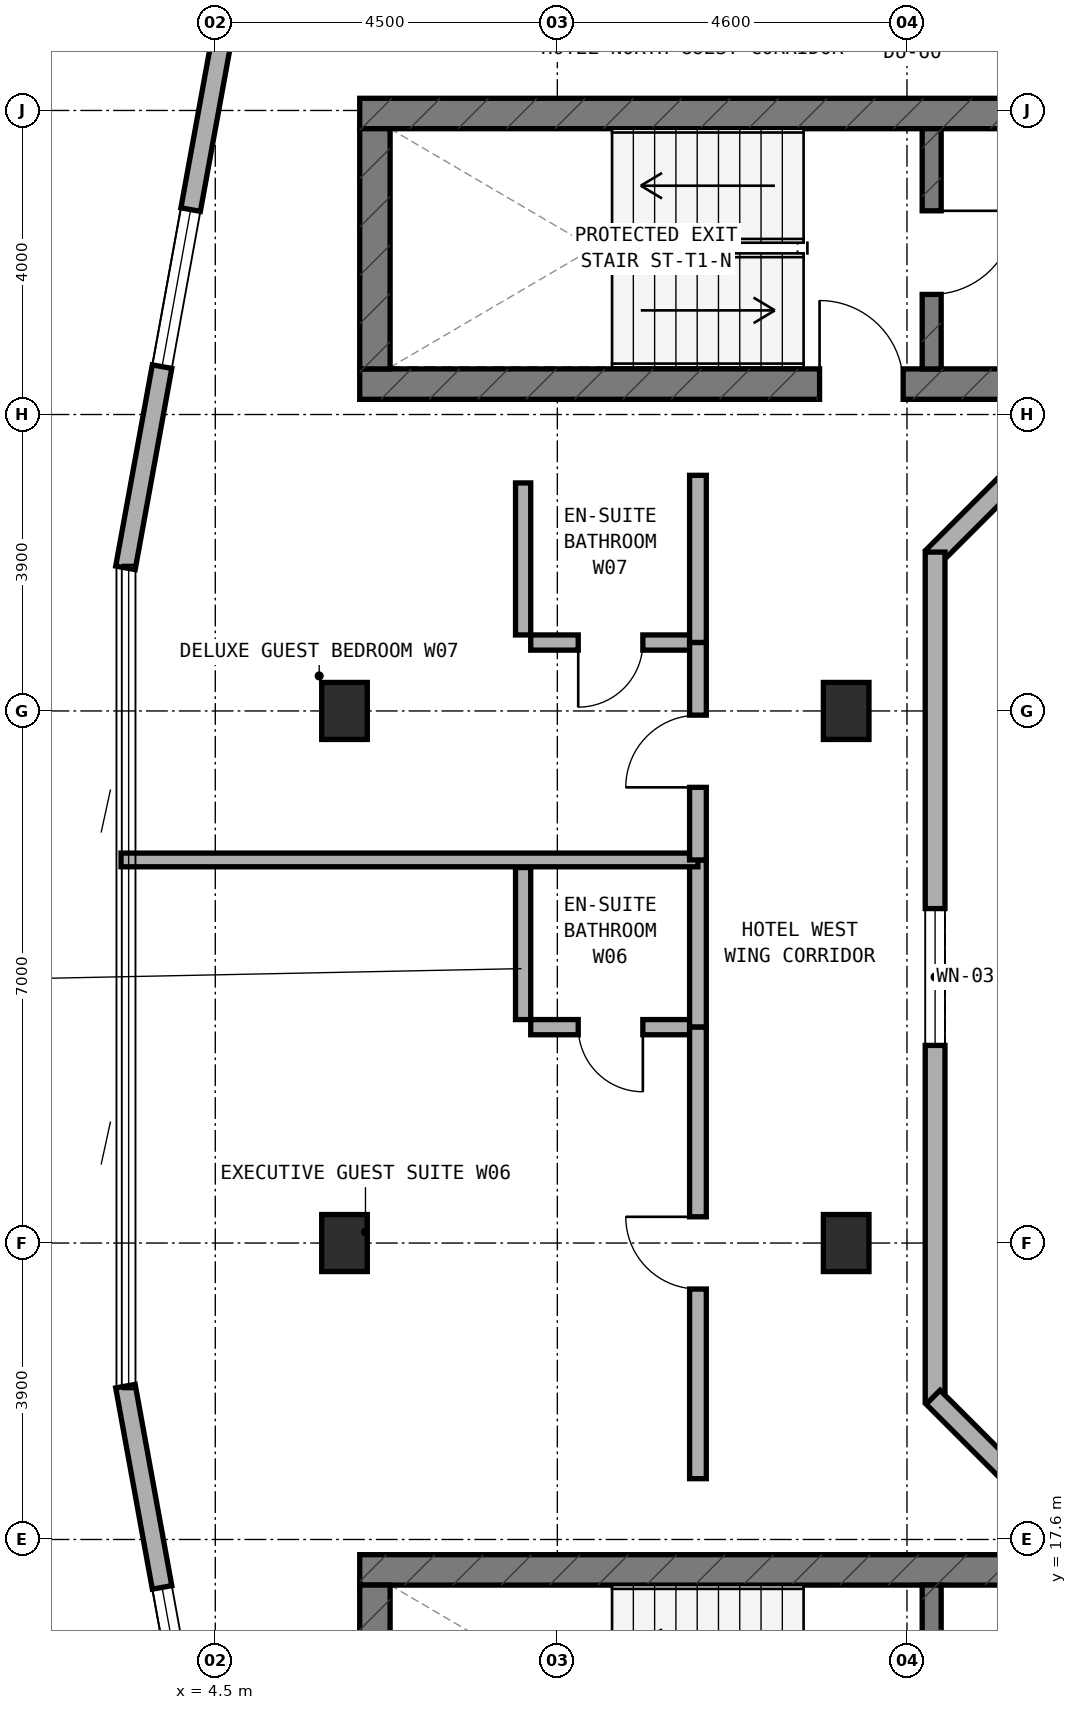
"""IFC4 building model, lengths in metres.
Left out: names, types, materials, properties, quantities, classifications, styles, units other than length and angle.
Written with IfcOpenShell. Run it as: python <this file> out.ifc"""

import sys

from ifc_helpers import new_model, si_unit, direction, frame, frame_2d, origin, origin_2d, place, context, subcontext, project, spatial, rectangle, extrude, element, fill, save


model = new_model("IFC4")
c1 = context("Model", 3, precision=1e-05, world=origin(), true_north=direction((0.0, 1.0)))
c2 = subcontext(c1, "Body", "Model", "MODEL_VIEW")
j1 = project(units=[si_unit("LENGTHUNIT", "METRE"), si_unit("PLANEANGLEUNIT", "RADIAN")], contexts=[c1])
p1 = place(None, origin())
s1 = spatial("IfcSite", under=j1, at=p1, CompositionType="ELEMENT")
p2 = place(p1, origin())
s2 = spatial("IfcBuilding", under=s1, at=p2, CompositionType="ELEMENT")
p3 = place(p2, frame((0.0, 0.0, 254.0)))
s3 = spatial("IfcBuildingStorey", under=s2, at=p3, CompositionType="ELEMENT", Elevation=254.0)
p4 = place(p3, frame((6.4, 32.8, 0.0), z_axis=(0.0, 0.0, 1.0), x_axis=(1.0, 0.0, 0.0)))
e1 = element("IfcWall", 1, at=p4, inside=s3, PredefinedType="SHEAR", context=c2, shape_type="SweptSolid", body=[
    extrude(rectangle(XDim=24.4, YDim=0.4, at=frame_2d((12.2, 0.0))), origin(), (0.0, 0.0, 1.0), 3.6),
])
p5 = place(p4, frame((6.05, 0.0, 0.0)))
e2 = element("IfcOpeningElement", 2, at=p5, cuts=e1, PredefinedType="OPENING", context=c2, shape_type="SweptSolid", body=[
    extrude(rectangle(XDim=1.1, YDim=2.15, at=frame_2d((0.55, 1.075))), frame((0.0, 0.21, 0.0), z_axis=(0.0, -1.0, 0.0), x_axis=(1.0, 0.0, 0.0)), (0.0, 0.0, 1.0), 0.42),
])
p6 = place(p3, frame((6.4, 36.36, 0.0), z_axis=(0.0, 0.0, 1.0), x_axis=(1.0, 0.0, 0.0)))
e3 = element("IfcWall", 3, at=p6, inside=s3, PredefinedType="SHEAR", context=c2, shape_type="SweptSolid", body=[
    extrude(rectangle(XDim=24.4, YDim=0.4, at=frame_2d((12.2, 0.0))), origin(), (0.0, 0.0, 1.0), 3.6),
])
p7 = place(p6, frame((9.15, 0.0, 0.0)))
e4 = element("IfcOpeningElement", 4, at=p7, cuts=e3, PredefinedType="OPENING", context=c2, shape_type="SweptSolid", body=[
    extrude(rectangle(XDim=1.2, YDim=2.15, at=frame_2d((0.6, 1.075))), frame((0.0, 0.21, 0.0), z_axis=(0.0, -1.0, 0.0), x_axis=(1.0, 0.0, 0.0)), (0.0, 0.0, 1.0), 0.42),
])
p8 = place(p6, frame((19.2, 0.0, 0.0)))
e5 = element("IfcOpeningElement", 5, at=p8, cuts=e3, PredefinedType="OPENING", context=c2, shape_type="SweptSolid", body=[
    extrude(rectangle(XDim=0.85, YDim=2.1, at=frame_2d((0.425, 1.05))), frame((0.0, 0.21, 0.0), z_axis=(0.0, -1.0, 0.0), x_axis=(1.0, 0.0, 0.0)), (0.0, 0.0, 1.0), 0.42),
])
p9 = place(p6, frame((16.94, 0.0, 0.0)))
e6 = element("IfcOpeningElement", 6, at=p9, cuts=e3, PredefinedType="OPENING", context=c2, shape_type="SweptSolid", body=[
    extrude(rectangle(XDim=0.85, YDim=2.1, at=frame_2d((0.425, 1.05))), frame((0.0, 0.21, 0.0), z_axis=(0.0, -1.0, 0.0), x_axis=(1.0, 0.0, 0.0)), (0.0, 0.0, 1.0), 0.42),
])
p10 = place(p3, frame((6.6, 33.0, 0.0), z_axis=(0.0, 0.0, 1.0), x_axis=(0.0, 1.0, 0.0)))
e7 = element("IfcWall", 7, at=p10, inside=s3, PredefinedType="SHEAR", context=c2, shape_type="SweptSolid", body=[
    extrude(rectangle(XDim=3.16, YDim=0.4, at=frame_2d((1.58, 0.0))), origin(), (0.0, 0.0, 1.0), 3.6),
])
p11 = place(p3, frame((13.925, 33.0, 0.0), z_axis=(0.0, 0.0, 1.0), x_axis=(0.0, 1.0, 0.0)))
e8 = element("IfcWall", 8, at=p11, inside=s3, PredefinedType="STANDARD", context=c2, shape_type="SweptSolid", body=[
    extrude(rectangle(XDim=3.16, YDim=0.25, at=frame_2d((1.58, 0.0))), origin(), (0.0, 0.0, 1.0), 3.32),
])
p12 = place(p11, frame((0.98, 0.0, 0.0)))
e9 = element("IfcOpeningElement", 9, at=p12, cuts=e8, PredefinedType="OPENING", context=c2, shape_type="SweptSolid", body=[
    extrude(rectangle(XDim=1.1, YDim=2.15, at=frame_2d((0.55, 1.075))), frame((0.0, 0.135, 0.0), z_axis=(0.0, -1.0, 0.0), x_axis=(1.0, 0.0, 0.0)), (0.0, 0.0, 1.0), 0.27),
])
p13 = place(p3, frame((6.4, 17.2, 0.0), z_axis=(0.0, 0.0, 1.0), x_axis=(1.0, 0.0, 0.0)))
e10 = element("IfcWall", 10, at=p13, inside=s3, PredefinedType="SHEAR", context=c2, shape_type="SweptSolid", body=[
    extrude(rectangle(XDim=24.4, YDim=0.4, at=frame_2d((12.2, 0.0))), origin(), (0.0, 0.0, 1.0), 3.6),
])
p14 = place(p3, frame((6.6, 13.84, 0.0), z_axis=(0.0, 0.0, 1.0), x_axis=(0.0, 1.0, 0.0)))
e11 = element("IfcWall", 11, at=p14, inside=s3, PredefinedType="SHEAR", context=c2, shape_type="SweptSolid", body=[
    extrude(rectangle(XDim=3.16, YDim=0.4, at=frame_2d((1.58, 0.0))), origin(), (0.0, 0.0, 1.0), 3.6),
])
p15 = place(p3, frame((13.925, 13.84, 0.0), z_axis=(0.0, 0.0, 1.0), x_axis=(0.0, 1.0, 0.0)))
e12 = element("IfcWall", 12, at=p15, inside=s3, PredefinedType="STANDARD", context=c2, shape_type="SweptSolid", body=[
    extrude(rectangle(XDim=3.16, YDim=0.25, at=frame_2d((1.58, 0.0))), origin(), (0.0, 0.0, 1.0), 3.32),
])
p16 = place(p15, frame((0.98, 0.0, 0.0)))
e13 = element("IfcOpeningElement", 13, at=p16, cuts=e12, PredefinedType="OPENING", context=c2, shape_type="SweptSolid", body=[
    extrude(rectangle(XDim=1.1, YDim=2.15, at=frame_2d((0.55, 1.075))), frame((0.0, 0.135, 0.0), z_axis=(0.0, -1.0, 0.0), x_axis=(1.0, 0.0, 0.0)), (0.0, 0.0, 1.0), 0.27),
])
for number, where, z_axis, x_axis in (
    (14, (6.2, 21.5, 0.0), (0.0, 0.0, 1.0), (1.0, 0.0, 0.0)),
    (15, (6.2, 28.5, 0.0), (0.0, 0.0, 1.0), (1.0, 0.0, 0.0)),
    (16, (12.8, 21.5, 0.0), (0.0, 0.0, 1.0), (1.0, 0.0, 0.0)),
    (17, (12.8, 28.5, 0.0), (0.0, 0.0, 1.0), (1.0, 0.0, 0.0)),
):
    element("IfcColumn", number, at=place(p3, frame(where, z_axis=z_axis, x_axis=x_axis)), inside=s3, PredefinedType="COLUMN", context=c2, shape_type="SweptSolid", body=[
        extrude(rectangle(XDim=0.6, YDim=0.75, at=origin_2d()), origin(), (0.0, 0.0, 1.0), 3.6),
    ])
p17 = place(p3, frame((4.829, 38.685, 0.0), z_axis=(0.0, 0.0, 1.0), x_axis=(-0.179061111398, -0.983837953316, 0.0)))
e18 = element("IfcWall", 18, at=p17, inside=s3, PredefinedType="STANDARD", context=c2, shape_type="SweptSolid", body=[
    extrude(rectangle(XDim=8.438, YDim=0.26, at=frame_2d((4.219, 0.0))), origin(), (0.0, 0.0, 1.0), 3.32),
])
p18 = place(p17, frame((3.648, 0.0, 0.85)))
e19 = element("IfcOpeningElement", 19, at=p18, cuts=e18, PredefinedType="OPENING", context=c2, shape_type="SweptSolid", body=[
    extrude(rectangle(XDim=2.1, YDim=1.5, at=frame_2d((1.05, 0.75))), frame((0.0, 0.14, 0.0), z_axis=(0.0, -1.0, 0.0), x_axis=(1.0, 0.0, 0.0)), (0.0, 0.0, 1.0), 0.28),
])
p19 = place(p3, frame((3.318, 19.617, 0.0), z_axis=(0.0, 0.0, 1.0), x_axis=(0.179061111398, -0.983837953316, 0.0)))
e20 = element("IfcWall", 20, at=p19, inside=s3, PredefinedType="STANDARD", context=c2, shape_type="SweptSolid", body=[
    extrude(rectangle(XDim=8.438, YDim=0.26, at=frame_2d((4.219, 0.0))), origin(), (0.0, 0.0, 1.0), 3.32),
])
p20 = place(p19, frame((2.691, 0.0, 0.85)))
e21 = element("IfcOpeningElement", 21, at=p20, cuts=e20, PredefinedType="OPENING", context=c2, shape_type="SweptSolid", body=[
    extrude(rectangle(XDim=2.1, YDim=1.5, at=frame_2d((1.05, 0.75))), frame((0.0, 0.14, 0.0), z_axis=(0.0, -1.0, 0.0), x_axis=(1.0, 0.0, 0.0)), (0.0, 0.0, 1.0), 0.28),
])
p21 = place(p3, frame((15.578, 32.162, 0.0), z_axis=(0.0, 0.0, 1.0), x_axis=(-0.707053950914, -0.707159607512, 0.0)))
e22 = element("IfcWall", 22, at=p21, inside=s3, PredefinedType="STANDARD", context=c2, shape_type="SweptSolid", body=[
    extrude(rectangle(XDim=2.311, YDim=0.26, at=frame_2d((1.155, 0.0))), origin(), (0.0, 0.0, 1.0), 3.32),
])
p22 = place(p3, frame((13.97, 30.59, 0.0), z_axis=(0.0, 0.0, 1.0), x_axis=(0.0, -1.0, 0.0)))
e23 = element("IfcWall", 23, at=p22, inside=s3, PredefinedType="STANDARD", context=c2, shape_type="SweptSolid", body=[
    extrude(rectangle(XDim=11.18, YDim=0.26, at=frame_2d((5.59, 0.0))), origin(), (0.0, 0.0, 1.0), 3.32),
])
p23 = place(p22, frame((4.69, 0.0, 0.85)))
e24 = element("IfcOpeningElement", 24, at=p23, cuts=e23, PredefinedType="OPENING", context=c2, shape_type="SweptSolid", body=[
    extrude(rectangle(XDim=1.8, YDim=1.5, at=frame_2d((0.9, 0.75))), frame((0.0, 0.14, 0.0), z_axis=(0.0, -1.0, 0.0), x_axis=(1.0, 0.0, 0.0)), (0.0, 0.0, 1.0), 0.28),
])
p24 = place(p3, frame((13.944, 19.472, 0.0), z_axis=(0.0, 0.0, 1.0), x_axis=(0.707053950914, -0.707159607512, 0.0)))
e25 = element("IfcWall", 25, at=p24, inside=s3, PredefinedType="STANDARD", context=c2, shape_type="SweptSolid", body=[
    extrude(rectangle(XDim=2.311, YDim=0.26, at=frame_2d((1.155, 0.0))), origin(), (0.0, 0.0, 1.0), 3.32),
])
p25 = place(p3, frame((8.65, 24.34, 0.0), z_axis=(0.0, 0.0, 1.0), x_axis=(1.0, 0.0, 0.0)))
e26 = element("IfcWall", 26, at=p25, inside=s3, PredefinedType="PLUMBINGWALL", context=c2, shape_type="SweptSolid", body=[
    extrude(rectangle(XDim=2.1, YDim=0.2, at=frame_2d((1.05, 0.0))), origin(), (0.0, 0.0, 1.0), 3.32),
])
p26 = place(p25, frame((0.625, 0.0, 0.0)))
e27 = element("IfcOpeningElement", 27, at=p26, cuts=e26, PredefinedType="OPENING", context=c2, shape_type="SweptSolid", body=[
    extrude(rectangle(XDim=0.85, YDim=2.1, at=frame_2d((0.425, 1.05))), frame((0.0, 0.11, 0.0), z_axis=(0.0, -1.0, 0.0), x_axis=(1.0, 0.0, 0.0)), (0.0, 0.0, 1.0), 0.22),
])
p27 = place(p3, frame((8.55, 24.44, 0.0), z_axis=(0.0, 0.0, 1.0), x_axis=(0.0, 1.0, 0.0)))
e28 = element("IfcWall", 28, at=p27, inside=s3, PredefinedType="PLUMBINGWALL", context=c2, shape_type="SweptSolid", body=[
    extrude(rectangle(XDim=2.0, YDim=0.2, at=frame_2d((1.0, 0.0))), origin(), (0.0, 0.0, 1.0), 3.32),
])
p28 = place(p3, frame((10.85, 24.34, 0.0), z_axis=(0.0, 0.0, 1.0), x_axis=(0.0, 1.0, 0.0)))
e29 = element("IfcWall", 29, at=p28, inside=s3, PredefinedType="SOLIDWALL", context=c2, shape_type="SweptSolid", body=[
    extrude(rectangle(XDim=2.2, YDim=0.22, at=frame_2d((1.1, 0.0))), origin(), (0.0, 0.0, 1.0), 3.32),
])
p29 = place(p3, frame((10.85, 18.4, 0.0), z_axis=(0.0, 0.0, 1.0), x_axis=(0.0, 1.0, 0.0)))
e30 = element("IfcWall", 30, at=p29, inside=s3, PredefinedType="SOLIDWALL", context=c2, shape_type="SweptSolid", body=[
    extrude(rectangle(XDim=5.94, YDim=0.22, at=frame_2d((2.97, 0.0))), origin(), (0.0, 0.0, 1.0), 2.745),
])
p30 = place(p29, frame((2.495, 0.0, 0.0)))
e31 = element("IfcOpeningElement", 31, at=p30, cuts=e30, PredefinedType="OPENING", context=c2, shape_type="SweptSolid", body=[
    extrude(rectangle(XDim=0.95, YDim=2.1, at=frame_2d((0.475, 1.05))), frame((0.0, 0.12, 0.0), z_axis=(0.0, -1.0, 0.0), x_axis=(1.0, 0.0, 0.0)), (0.0, 0.0, 1.0), 0.24),
])
p31 = place(p3, frame((3.26, 26.54, 0.0), z_axis=(0.0, 0.0, 1.0), x_axis=(1.0, 0.0, 0.0)))
e32 = element("IfcWall", 32, at=p31, inside=s3, PredefinedType="SOLIDWALL", context=c2, shape_type="SweptSolid", body=[
    extrude(rectangle(XDim=7.59, YDim=0.18, at=frame_2d((3.795, 0.0))), origin(), (0.0, 0.0, 1.0), 3.015),
])
p32 = place(p3, frame((8.65, 29.4, 0.0), z_axis=(0.0, 0.0, 1.0), x_axis=(1.0, 0.0, 0.0)))
e33 = element("IfcWall", 33, at=p32, inside=s3, PredefinedType="PLUMBINGWALL", context=c2, shape_type="SweptSolid", body=[
    extrude(rectangle(XDim=2.1, YDim=0.2, at=frame_2d((1.05, 0.0))), origin(), (0.0, 0.0, 1.0), 3.32),
])
p33 = place(p32, frame((0.625, 0.0, 0.0)))
e34 = element("IfcOpeningElement", 34, at=p33, cuts=e33, PredefinedType="OPENING", context=c2, shape_type="SweptSolid", body=[
    extrude(rectangle(XDim=0.85, YDim=2.1, at=frame_2d((0.425, 1.05))), frame((0.0, 0.11, 0.0), z_axis=(0.0, -1.0, 0.0), x_axis=(1.0, 0.0, 0.0)), (0.0, 0.0, 1.0), 0.22),
])
p34 = place(p3, frame((8.55, 29.5, 0.0), z_axis=(0.0, 0.0, 1.0), x_axis=(0.0, 1.0, 0.0)))
e35 = element("IfcWall", 35, at=p34, inside=s3, PredefinedType="PLUMBINGWALL", context=c2, shape_type="SweptSolid", body=[
    extrude(rectangle(XDim=2.0, YDim=0.2, at=frame_2d((1.0, 0.0))), origin(), (0.0, 0.0, 1.0), 3.32),
])
p35 = place(p3, frame((10.85, 29.4, 0.0), z_axis=(0.0, 0.0, 1.0), x_axis=(0.0, 1.0, 0.0)))
e36 = element("IfcWall", 36, at=p35, inside=s3, PredefinedType="SOLIDWALL", context=c2, shape_type="SweptSolid", body=[
    extrude(rectangle(XDim=2.2, YDim=0.22, at=frame_2d((1.1, 0.0))), origin(), (0.0, 0.0, 1.0), 3.32),
])
p36 = place(p3, frame((10.85, 26.54, 0.0), z_axis=(0.0, 0.0, 1.0), x_axis=(0.0, 1.0, 0.0)))
e37 = element("IfcWall", 37, at=p36, inside=s3, PredefinedType="SOLIDWALL", context=c2, shape_type="SweptSolid", body=[
    extrude(rectangle(XDim=2.86, YDim=0.22, at=frame_2d((1.43, 0.0))), origin(), (0.0, 0.0, 1.0), 2.745),
])
p37 = place(p36, frame((0.955, 0.0, 0.0)))
e38 = element("IfcOpeningElement", 38, at=p37, cuts=e37, PredefinedType="OPENING", context=c2, shape_type="SweptSolid", body=[
    extrude(rectangle(XDim=0.95, YDim=2.1, at=frame_2d((0.475, 1.05))), frame((0.0, 0.12, 0.0), z_axis=(0.0, -1.0, 0.0), x_axis=(1.0, 0.0, 0.0)), (0.0, 0.0, 1.0), 0.24),
])
p38 = place(p18, origin())
e39 = element("IfcWindow", 39, at=p38, inside=s3, PartitioningType="SINGLE_PANEL", PredefinedType="WINDOW", context=c2, shape_type="SweptSolid", body=[
    extrude(rectangle(XDim=2.1, YDim=1.5, at=frame_2d((1.05, 0.75))), frame((0.0, 0.03, 0.0), z_axis=(0.0, -1.0, 0.0), x_axis=(1.0, 0.0, 0.0)), (0.0, 0.0, 1.0), 0.06),
])
fill(e19, e39)
p39 = place(p20, origin())
e40 = element("IfcWindow", 40, at=p39, inside=s3, PartitioningType="SINGLE_PANEL", PredefinedType="WINDOW", context=c2, shape_type="SweptSolid", body=[
    extrude(rectangle(XDim=2.1, YDim=1.5, at=frame_2d((1.05, 0.75))), frame((0.0, 0.03, 0.0), z_axis=(0.0, -1.0, 0.0), x_axis=(1.0, 0.0, 0.0)), (0.0, 0.0, 1.0), 0.06),
])
fill(e21, e40)
p40 = place(p23, origin())
e41 = element("IfcWindow", 41, at=p40, inside=s3, PartitioningType="SINGLE_PANEL", PredefinedType="WINDOW", context=c2, shape_type="SweptSolid", body=[
    extrude(rectangle(XDim=1.8, YDim=1.5, at=frame_2d((0.9, 0.75))), frame((0.0, 0.03, 0.0), z_axis=(0.0, -1.0, 0.0), x_axis=(1.0, 0.0, 0.0)), (0.0, 0.0, 1.0), 0.06),
])
fill(e24, e41)
p41 = place(p12, frame((1.1, 0.0, 0.0), z_axis=(0.0, 0.0, 1.0), x_axis=(-1.0, 0.0, 0.0)))
e42 = element("IfcDoor", 42, at=p41, inside=s3, OperationType="SINGLE_SWING_LEFT", PredefinedType="DOOR", context=c2, shape_type="SweptSolid", body=[
    extrude(rectangle(XDim=1.1, YDim=2.15, at=frame_2d((0.55, 1.075))), frame((0.0, 0.025, 0.0), z_axis=(0.0, -1.0, 0.0), x_axis=(1.0, 0.0, 0.0)), (0.0, 0.0, 1.0), 0.05),
])
fill(e9, e42)
p42 = place(p5, origin())
e43 = element("IfcDoor", 43, at=p42, inside=s3, OperationType="SINGLE_SWING_LEFT", PredefinedType="DOOR", context=c2, shape_type="SweptSolid", body=[
    extrude(rectangle(XDim=1.1, YDim=2.15, at=frame_2d((0.55, 1.075))), frame((0.0, 0.025, 0.0), z_axis=(0.0, -1.0, 0.0), x_axis=(1.0, 0.0, 0.0)), (0.0, 0.0, 1.0), 0.05),
])
fill(e2, e43)
p43 = place(p26, frame((0.85, 0.0, 0.0), z_axis=(0.0, 0.0, 1.0), x_axis=(-1.0, 0.0, 0.0)))
e44 = element("IfcDoor", 44, at=p43, inside=s3, OperationType="SINGLE_SWING_LEFT", PredefinedType="DOOR", context=c2, shape_type="SweptSolid", body=[
    extrude(rectangle(XDim=0.85, YDim=2.1, at=frame_2d((0.425, 1.05))), frame((0.0, 0.025, 0.0), z_axis=(0.0, -1.0, 0.0), x_axis=(1.0, 0.0, 0.0)), (0.0, 0.0, 1.0), 0.05),
])
fill(e27, e44)
p44 = place(p30, origin())
e45 = element("IfcDoor", 45, at=p44, inside=s3, OperationType="SINGLE_SWING_RIGHT", PredefinedType="DOOR", context=c2, shape_type="SweptSolid", body=[
    extrude(rectangle(XDim=0.95, YDim=2.1, at=frame_2d((0.475, 1.05))), frame((0.0, 0.025, 0.0), z_axis=(0.0, -1.0, 0.0), x_axis=(1.0, 0.0, 0.0)), (0.0, 0.0, 1.0), 0.05),
])
fill(e31, e45)
p45 = place(p33, frame((0.85, 0.0, 0.0), z_axis=(0.0, 0.0, 1.0), x_axis=(-1.0, 0.0, 0.0)))
e46 = element("IfcDoor", 46, at=p45, inside=s3, OperationType="SINGLE_SWING_RIGHT", PredefinedType="DOOR", context=c2, shape_type="SweptSolid", body=[
    extrude(rectangle(XDim=0.85, YDim=2.1, at=frame_2d((0.425, 1.05))), frame((0.0, 0.025, 0.0), z_axis=(0.0, -1.0, 0.0), x_axis=(1.0, 0.0, 0.0)), (0.0, 0.0, 1.0), 0.05),
])
fill(e34, e46)
p46 = place(p37, origin())
e47 = element("IfcDoor", 47, at=p46, inside=s3, OperationType="SINGLE_SWING_LEFT", PredefinedType="DOOR", context=c2, shape_type="SweptSolid", body=[
    extrude(rectangle(XDim=0.95, YDim=2.1, at=frame_2d((0.475, 1.05))), frame((0.0, 0.025, 0.0), z_axis=(0.0, -1.0, 0.0), x_axis=(1.0, 0.0, 0.0)), (0.0, 0.0, 1.0), 0.05),
])
fill(e38, e47)
save(model, sys.argv[1])
